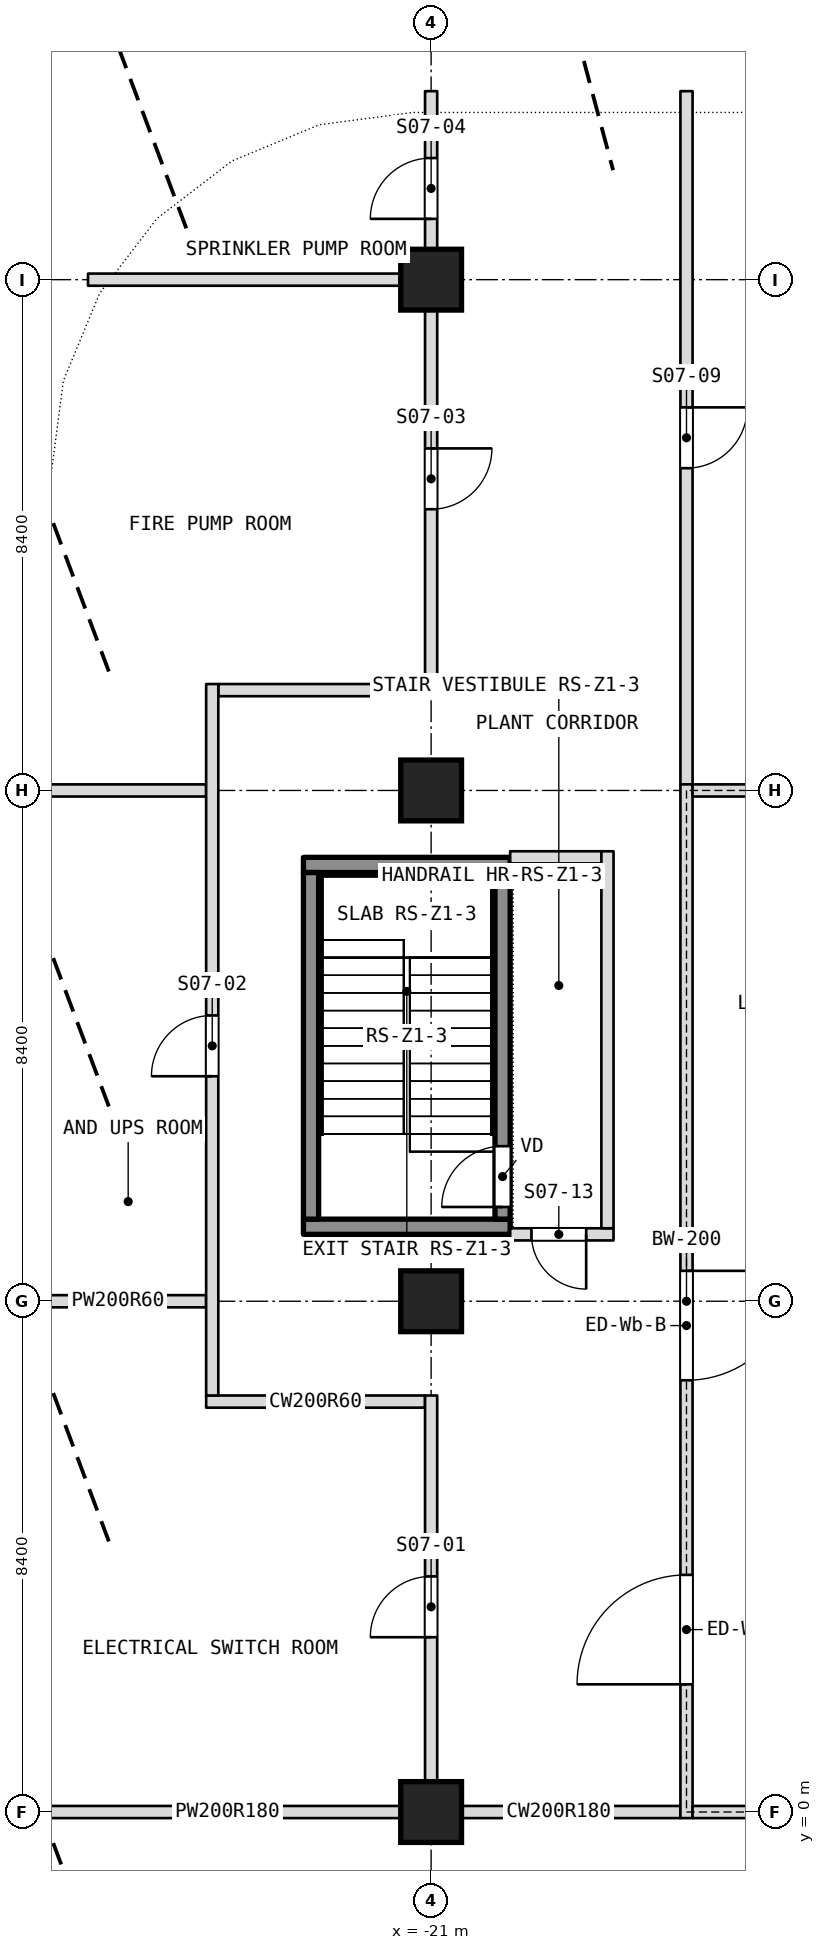
"""IFC4 building model, lengths in metres.
Left out: names, types, materials, properties, quantities, classifications, styles, units other than length and angle.
Written with IfcOpenShell. Run it as: python <this file> out.ifc"""

import sys

from ifc_helpers import new_model, si_unit, direction, frame, frame_2d, origin, origin_2d, place, context, subcontext, project, spatial, rectangle, extrude, element, fill, save


model = new_model("IFC4")
c1 = context("Model", 3, precision=1e-05, world=origin(), true_north=direction((0.0, 1.0)))
c2 = subcontext(c1, "Body", "Model", "MODEL_VIEW")
j1 = project(units=[si_unit("LENGTHUNIT", "METRE"), si_unit("PLANEANGLEUNIT", "RADIAN")], contexts=[c1])
p1 = place(None, origin())
s1 = spatial("IfcSite", under=j1, at=p1, CompositionType="ELEMENT")
p2 = place(p1, origin())
s2 = spatial("IfcBuilding", under=s1, at=p2, CompositionType="ELEMENT")
p3 = place(p2, frame((0.0, 0.0, 86.9)))
s3 = spatial("IfcBuildingStorey", under=s2, at=p3, CompositionType="ELEMENT", Elevation=86.9)
for number, where, z_axis, x_axis in (
    (1, (-21.0, 0.0, 0.0), (0.0, 0.0, 1.0), (1.0, 0.0, 0.0)),
    (2, (-21.0, 8.4, 0.0), (0.0, 0.0, 1.0), (1.0, 0.0, 0.0)),
    (3, (-21.0, 16.8, 0.0), (0.0, 0.0, 1.0), (1.0, 0.0, 0.0)),
    (4, (-21.0, 25.2, 0.0), (0.0, 0.0, 1.0), (1.0, 0.0, 0.0)),
):
    element("IfcColumn", number, at=place(p3, frame(where, z_axis=z_axis, x_axis=x_axis)), inside=s3, PredefinedType="COLUMN", context=c2, shape_type="SweptSolid", body=[
        extrude(rectangle(XDim=1.0, YDim=1.0, at=origin_2d()), origin(), (0.0, 0.0, 1.0), 10.8),
    ])
p4 = place(p3, frame((-27.6, 0.0, 0.0), z_axis=(0.0, 0.0, 1.0), x_axis=(1.0, 0.0, 0.0)))
e5 = element("IfcWall", 5, at=p4, inside=s3, PredefinedType="PARTITIONING", context=c2, shape_type="SweptSolid", body=[
    extrude(rectangle(XDim=6.5, YDim=0.2, at=frame_2d((3.25, 0.0))), origin(), (0.0, 0.0, 1.0), 10.09),
])
p5 = place(p3, frame((-20.9, 0.0, 0.0), z_axis=(0.0, 0.0, 1.0), x_axis=(1.0, 0.0, 0.0)))
e6 = element("IfcWall", 6, at=p5, inside=s3, PredefinedType="PARTITIONING", context=c2, shape_type="SweptSolid", body=[
    extrude(rectangle(XDim=4.0, YDim=0.2, at=frame_2d((2.0, 0.0))), origin(), (0.0, 0.0, 1.0), 10.09),
])
p6 = place(p3, frame((-24.7, 6.75, 0.0), z_axis=(0.0, 0.0, 1.0), x_axis=(1.0, 0.0, 0.0)))
e7 = element("IfcWall", 7, at=p6, inside=s3, PredefinedType="PARTITIONING", context=c2, shape_type="SweptSolid", body=[
    extrude(rectangle(XDim=3.6, YDim=0.2, at=frame_2d((1.8, 0.0))), origin(), (0.0, 0.0, 1.0), 10.54),
])
p7 = place(p3, frame((-27.6, 8.4, 0.0), z_axis=(0.0, 0.0, 1.0), x_axis=(1.0, 0.0, 0.0)))
e8 = element("IfcWall", 8, at=p7, inside=s3, PredefinedType="PARTITIONING", context=c2, shape_type="SweptSolid", body=[
    extrude(rectangle(XDim=2.9, YDim=0.2, at=frame_2d((1.45, 0.0))), origin(), (0.0, 0.0, 1.0), 10.09),
])
p8 = place(p3, frame((-19.7, 9.5, 0.0), z_axis=(0.0, 0.0, 1.0), x_axis=(1.0, 0.0, 0.0)))
e9 = element("IfcWall", 9, at=p8, inside=s3, PredefinedType="PARTITIONING", context=c2, shape_type="SweptSolid", body=[
    extrude(rectangle(XDim=1.7, YDim=0.2, at=frame_2d((0.85, 0.0))), origin(), (0.0, 0.0, 1.0), 10.54),
])
p9 = place(p8, frame((0.35, 0.0, 0.0)))
e10 = element("IfcOpeningElement", 10, at=p9, cuts=e9, PredefinedType="OPENING", context=c2, shape_type="SweptSolid", body=[
    extrude(rectangle(XDim=0.9, YDim=2.1, at=frame_2d((0.45, 1.05))), frame((0.0, 0.1, 0.0), z_axis=(0.0, -1.0, 0.0), x_axis=(1.0, 0.0, 0.0)), (0.0, 0.0, 1.0), 0.2),
])
p10 = place(p3, frame((-19.7, 15.7, 0.0), z_axis=(0.0, 0.0, 1.0), x_axis=(1.0, 0.0, 0.0)))
e11 = element("IfcWall", 11, at=p10, inside=s3, PredefinedType="PARTITIONING", context=c2, shape_type="SweptSolid", body=[
    extrude(rectangle(XDim=1.5, YDim=0.2, at=frame_2d((0.75, 0.0))), origin(), (0.0, 0.0, 1.0), 10.54),
])
p11 = place(p3, frame((-16.8, 16.9, 0.0), z_axis=(0.0, 0.0, 1.0), x_axis=(0.0, 1.0, 0.0)))
e12 = element("IfcWall", 12, at=p11, inside=s3, PredefinedType="PARTITIONING", context=c2, shape_type="SweptSolid", body=[
    extrude(rectangle(XDim=11.4, YDim=0.2, at=frame_2d((5.7, 0.0))), origin(), (0.0, 0.0, 1.0), 10.14),
])
p12 = place(p11, frame((5.2, 0.0, 0.0)))
e13 = element("IfcOpeningElement", 13, at=p12, cuts=e12, PredefinedType="OPENING", context=c2, shape_type="SweptSolid", body=[
    extrude(rectangle(XDim=1.0, YDim=2.1, at=frame_2d((0.5, 1.05))), frame((0.0, 0.1, 0.0), z_axis=(0.0, -1.0, 0.0), x_axis=(1.0, 0.0, 0.0)), (0.0, 0.0, 1.0), 0.2),
])
p13 = place(p3, frame((-27.6, 16.8, 0.0), z_axis=(0.0, 0.0, 1.0), x_axis=(1.0, 0.0, 0.0)))
e14 = element("IfcWall", 14, at=p13, inside=s3, PredefinedType="PARTITIONING", context=c2, shape_type="SweptSolid", body=[
    extrude(rectangle(XDim=2.9, YDim=0.2, at=frame_2d((1.45, 0.0))), origin(), (0.0, 0.0, 1.0), 10.09),
])
p14 = place(p3, frame((-18.1, 9.6, 0.0), z_axis=(0.0, 0.0, 1.0), x_axis=(0.0, 1.0, 0.0)))
e15 = element("IfcWall", 15, at=p14, inside=s3, PredefinedType="PARTITIONING", context=c2, shape_type="SweptSolid", body=[
    extrude(rectangle(XDim=6.2, YDim=0.2, at=frame_2d((3.1, 0.0))), origin(), (0.0, 0.0, 1.0), 10.54),
])
p15 = place(p3, frame((-24.5, 18.45, 0.0), z_axis=(0.0, 0.0, 1.0), x_axis=(1.0, 0.0, 0.0)))
e16 = element("IfcWall", 16, at=p15, inside=s3, PredefinedType="PARTITIONING", context=c2, shape_type="SweptSolid", body=[
    extrude(rectangle(XDim=3.6, YDim=0.2, at=frame_2d((1.8, 0.0))), origin(), (0.0, 0.0, 1.0), 10.54),
])
p16 = place(p3, frame((-21.0, -0.1, 0.0), z_axis=(0.0, 0.0, 1.0), x_axis=(0.0, 1.0, 0.0)))
e17 = element("IfcWall", 17, at=p16, inside=s3, PredefinedType="PARTITIONING", context=c2, shape_type="SweptSolid", body=[
    extrude(rectangle(XDim=6.95, YDim=0.2, at=frame_2d((3.475, 0.0))), origin(), (0.0, 0.0, 1.0), 10.54),
])
p17 = place(p16, frame((2.975, 0.0, 0.0)))
e18 = element("IfcOpeningElement", 18, at=p17, cuts=e17, PredefinedType="OPENING", context=c2, shape_type="SweptSolid", body=[
    extrude(rectangle(XDim=1.0, YDim=2.1, at=frame_2d((0.5, 1.05))), frame((0.0, 0.1, 0.0), z_axis=(0.0, -1.0, 0.0), x_axis=(1.0, 0.0, 0.0)), (0.0, 0.0, 1.0), 0.2),
])
p18 = place(p3, frame((-21.0, 18.55, 0.0), z_axis=(0.0, 0.0, 1.0), x_axis=(0.0, 1.0, 0.0)))
e19 = element("IfcWall", 19, at=p18, inside=s3, PredefinedType="PARTITIONING", context=c2, shape_type="SweptSolid", body=[
    extrude(rectangle(XDim=9.75, YDim=0.2, at=frame_2d((4.875, 0.0))), origin(), (0.0, 0.0, 1.0), 10.14),
])
p19 = place(p18, frame((2.875, 0.0, 0.0)))
e20 = element("IfcOpeningElement", 20, at=p19, cuts=e19, PredefinedType="OPENING", context=c2, shape_type="SweptSolid", body=[
    extrude(rectangle(XDim=1.0, YDim=2.1, at=frame_2d((0.5, 1.05))), frame((0.0, 0.1, 0.0), z_axis=(0.0, -1.0, 0.0), x_axis=(1.0, 0.0, 0.0)), (0.0, 0.0, 1.0), 0.2),
])
p20 = place(p18, frame((7.65, 0.0, 0.0)))
e21 = element("IfcOpeningElement", 21, at=p20, cuts=e19, PredefinedType="OPENING", context=c2, shape_type="SweptSolid", body=[
    extrude(rectangle(XDim=1.0, YDim=2.1, at=frame_2d((0.5, 1.05))), frame((0.0, 0.1, 0.0), z_axis=(0.0, -1.0, 0.0), x_axis=(1.0, 0.0, 0.0)), (0.0, 0.0, 1.0), 0.2),
])
p21 = place(p3, frame((-24.6, 6.85, 0.0), z_axis=(0.0, 0.0, 1.0), x_axis=(0.0, 1.0, 0.0)))
e22 = element("IfcWall", 22, at=p21, inside=s3, PredefinedType="PARTITIONING", context=c2, shape_type="SweptSolid", body=[
    extrude(rectangle(XDim=11.7, YDim=0.2, at=frame_2d((5.85, 0.0))), origin(), (0.0, 0.0, 1.0), 10.54),
])
p22 = place(p21, frame((5.25, 0.0, 0.0)))
e23 = element("IfcOpeningElement", 23, at=p22, cuts=e22, PredefinedType="OPENING", context=c2, shape_type="SweptSolid", body=[
    extrude(rectangle(XDim=1.0, YDim=2.1, at=frame_2d((0.5, 1.05))), frame((0.0, 0.1, 0.0), z_axis=(0.0, -1.0, 0.0), x_axis=(1.0, 0.0, 0.0)), (0.0, 0.0, 1.0), 0.2),
])
p23 = place(p3, frame((-26.643, 25.2, 0.0), z_axis=(0.0, 0.0, 1.0), x_axis=(1.0, 0.0, 0.0)))
e24 = element("IfcWall", 24, at=p23, inside=s3, PredefinedType="PARTITIONING", context=c2, shape_type="SweptSolid", body=[
    extrude(rectangle(XDim=5.543, YDim=0.2, at=frame_2d((2.771, 0.0))), origin(), (0.0, 0.0, 1.0), 10.09),
])
p24 = place(p3, frame((-16.8, -0.1, 0.0), z_axis=(0.0, 0.0, 1.0), x_axis=(0.0, 1.0, 0.0)))
e25 = element("IfcWall", 25, at=p24, inside=s3, PredefinedType="PARTITIONING", context=c2, shape_type="SweptSolid", body=[
    extrude(rectangle(XDim=17.0, YDim=0.2, at=frame_2d((8.5, 0.0))), origin(), (0.0, 0.0, 1.0), 10.54),
])
p25 = place(p24, frame((2.2, 0.0, 0.0)))
e26 = element("IfcOpeningElement", 26, at=p25, cuts=e25, PredefinedType="OPENING", context=c2, shape_type="SweptSolid", body=[
    extrude(rectangle(XDim=1.8, YDim=2.1, at=frame_2d((0.9, 1.05))), frame((0.0, 0.1, 0.0), z_axis=(0.0, -1.0, 0.0), x_axis=(1.0, 0.0, 0.0)), (0.0, 0.0, 1.0), 0.2),
])
p26 = place(p24, frame((7.2, 0.0, 0.0)))
e27 = element("IfcOpeningElement", 27, at=p26, cuts=e25, PredefinedType="OPENING", context=c2, shape_type="SweptSolid", body=[
    extrude(rectangle(XDim=1.8, YDim=2.1, at=frame_2d((0.9, 1.05))), frame((0.0, 0.1, 0.0), z_axis=(0.0, -1.0, 0.0), x_axis=(1.0, 0.0, 0.0)), (0.0, 0.0, 1.0), 0.2),
])
p27 = place(p3, frame((-16.7, 0.0, 0.0), z_axis=(0.0, 0.0, 1.0), x_axis=(1.0, 0.0, 0.0)))
e28 = element("IfcWall", 28, at=p27, inside=s3, PredefinedType="PARTITIONING", context=c2, shape_type="SweptSolid", body=[
    extrude(rectangle(XDim=4.4, YDim=0.2, at=frame_2d((2.2, 0.0))), origin(), (0.0, 0.0, 1.0), 10.09),
])
p28 = place(p27, frame((3.1, 0.0, 0.0)))
e29 = element("IfcOpeningElement", 29, at=p28, cuts=e28, PredefinedType="OPENING", context=c2, shape_type="SweptSolid", body=[
    extrude(rectangle(XDim=1.2, YDim=2.1, at=frame_2d((0.6, 1.05))), frame((0.0, 0.1, 0.0), z_axis=(0.0, -1.0, 0.0), x_axis=(1.0, 0.0, 0.0)), (0.0, 0.0, 1.0), 0.2),
])
p29 = place(p3, frame((-16.7, 16.8, 0.0), z_axis=(0.0, 0.0, 1.0), x_axis=(1.0, 0.0, 0.0)))
e30 = element("IfcWall", 30, at=p29, inside=s3, PredefinedType="PARTITIONING", context=c2, shape_type="SweptSolid", body=[
    extrude(rectangle(XDim=4.4, YDim=0.2, at=frame_2d((2.2, 0.0))), origin(), (0.0, 0.0, 1.0), 10.09),
])
p30 = place(p29, frame((3.1, 0.0, 0.0)))
e31 = element("IfcOpeningElement", 31, at=p30, cuts=e30, PredefinedType="OPENING", context=c2, shape_type="SweptSolid", body=[
    extrude(rectangle(XDim=1.2, YDim=2.1, at=frame_2d((0.6, 1.05))), frame((0.0, 0.1, 0.0), z_axis=(0.0, -1.0, 0.0), x_axis=(1.0, 0.0, 0.0)), (0.0, 0.0, 1.0), 0.2),
])
for number, where, z_axis, x_axis in (
    (32, (-23.1, 9.625, 0.1), (0.0, 0.0, 1.0), (1.0, 0.0, 0.0)),
    (33, (-23.1, 15.575, 0.1), (0.0, 0.0, 1.0), (1.0, 0.0, 0.0)),
):
    element("IfcWall", number, at=place(p3, frame(where, z_axis=z_axis, x_axis=x_axis)), inside=s3, PredefinedType="SHEAR", context=c2, shape_type="SweptSolid", body=[
        extrude(rectangle(XDim=3.4, YDim=0.25, at=frame_2d((1.7, 0.0))), origin(), (0.0, 0.0, 1.0), 10.8),
    ])
p31 = place(p3, frame((-22.975, 9.75, 0.1), z_axis=(0.0, 0.0, 1.0), x_axis=(0.0, 1.0, 0.0)))
e34 = element("IfcWall", 34, at=p31, inside=s3, PredefinedType="SHEAR", context=c2, shape_type="SweptSolid", body=[
    extrude(rectangle(XDim=5.7, YDim=0.25, at=frame_2d((2.85, 0.0))), origin(), (0.0, 0.0, 1.0), 10.8),
])
p32 = place(p3, frame((-19.825, 9.75, 0.1), z_axis=(0.0, 0.0, 1.0), x_axis=(0.0, 1.0, 0.0)))
e35 = element("IfcWall", 35, at=p32, inside=s3, PredefinedType="SHEAR", context=c2, shape_type="SweptSolid", body=[
    extrude(rectangle(XDim=5.7, YDim=0.25, at=frame_2d((2.85, 0.0))), origin(), (0.0, 0.0, 1.0), 10.8),
])
p33 = place(p32, frame((0.2, 0.0, 0.0)))
e36 = element("IfcOpeningElement", 36, at=p33, cuts=e35, PredefinedType="OPENING", context=c2, shape_type="SweptSolid", body=[
    extrude(rectangle(XDim=1.0, YDim=2.1, at=frame_2d((0.5, 1.05))), frame((0.0, 0.125, 0.0), z_axis=(0.0, -1.0, 0.0), x_axis=(1.0, 0.0, 0.0)), (0.0, 0.0, 1.0), 0.25),
])
p34 = place(p17, origin())
e37 = element("IfcDoor", 37, at=p34, inside=s3, OperationType="SINGLE_SWING_LEFT", PredefinedType="DOOR", context=c2, shape_type="SweptSolid", body=[
    extrude(rectangle(XDim=1.0, YDim=2.1, at=frame_2d((0.5, 1.05))), frame((0.0, 0.025, 0.0), z_axis=(0.0, -1.0, 0.0), x_axis=(1.0, 0.0, 0.0)), (0.0, 0.0, 1.0), 0.05),
])
fill(e18, e37)
p35 = place(p22, origin())
e38 = element("IfcDoor", 38, at=p35, inside=s3, OperationType="SINGLE_SWING_RIGHT", PredefinedType="DOOR", context=c2, shape_type="SweptSolid", body=[
    extrude(rectangle(XDim=1.0, YDim=2.1, at=frame_2d((0.5, 1.05))), frame((0.0, 0.025, 0.0), z_axis=(0.0, -1.0, 0.0), x_axis=(1.0, 0.0, 0.0)), (0.0, 0.0, 1.0), 0.05),
])
fill(e23, e38)
p36 = place(p19, origin())
e39 = element("IfcDoor", 39, at=p36, inside=s3, OperationType="SINGLE_SWING_RIGHT", PredefinedType="DOOR", context=c2, shape_type="SweptSolid", body=[
    extrude(rectangle(XDim=1.0, YDim=2.1, at=frame_2d((0.5, 1.05))), frame((0.0, 0.025, 0.0), z_axis=(0.0, -1.0, 0.0), x_axis=(1.0, 0.0, 0.0)), (0.0, 0.0, 1.0), 0.05),
])
fill(e20, e39)
p37 = place(p20, origin())
e40 = element("IfcDoor", 40, at=p37, inside=s3, OperationType="SINGLE_SWING_LEFT", PredefinedType="DOOR", context=c2, shape_type="SweptSolid", body=[
    extrude(rectangle(XDim=1.0, YDim=2.1, at=frame_2d((0.5, 1.05))), frame((0.0, 0.025, 0.0), z_axis=(0.0, -1.0, 0.0), x_axis=(1.0, 0.0, 0.0)), (0.0, 0.0, 1.0), 0.05),
])
fill(e21, e40)
p38 = place(p12, origin())
e41 = element("IfcDoor", 41, at=p38, inside=s3, OperationType="SINGLE_SWING_RIGHT", PredefinedType="DOOR", context=c2, shape_type="SweptSolid", body=[
    extrude(rectangle(XDim=1.0, YDim=2.1, at=frame_2d((0.5, 1.05))), frame((0.0, 0.025, 0.0), z_axis=(0.0, -1.0, 0.0), x_axis=(1.0, 0.0, 0.0)), (0.0, 0.0, 1.0), 0.05),
])
fill(e13, e41)
p39 = place(p9, origin())
e42 = element("IfcDoor", 42, at=p39, inside=s3, OperationType="SINGLE_SWING_RIGHT", PredefinedType="DOOR", context=c2, shape_type="SweptSolid", body=[
    extrude(rectangle(XDim=0.9, YDim=2.1, at=frame_2d((0.45, 1.05))), frame((0.0, 0.025, 0.0), z_axis=(0.0, -1.0, 0.0), x_axis=(1.0, 0.0, 0.0)), (0.0, 0.0, 1.0), 0.05),
])
fill(e10, e42)
p40 = place(p33, origin())
e43 = element("IfcDoor", 43, at=p40, inside=s3, OperationType="SINGLE_SWING_LEFT", PredefinedType="DOOR", context=c2, shape_type="SweptSolid", body=[
    extrude(rectangle(XDim=1.0, YDim=2.1, at=frame_2d((0.5, 1.05))), frame((0.0, 0.025, 0.0), z_axis=(0.0, -1.0, 0.0), x_axis=(1.0, 0.0, 0.0)), (0.0, 0.0, 1.0), 0.05),
])
fill(e36, e43)
p41 = place(p25, origin())
e44 = element("IfcDoor", 44, at=p41, inside=s3, OperationType="DOUBLE_DOOR_SINGLE_SWING", PredefinedType="DOOR", context=c2, shape_type="SweptSolid", body=[
    extrude(rectangle(XDim=1.8, YDim=2.1, at=frame_2d((0.9, 1.05))), frame((0.0, 0.025, 0.0), z_axis=(0.0, -1.0, 0.0), x_axis=(1.0, 0.0, 0.0)), (0.0, 0.0, 1.0), 0.05),
])
fill(e26, e44)
p42 = place(p26, origin())
e45 = element("IfcDoor", 45, at=p42, inside=s3, OperationType="DOUBLE_DOOR_SINGLE_SWING", PredefinedType="DOOR", context=c2, shape_type="SweptSolid", body=[
    extrude(rectangle(XDim=1.8, YDim=2.1, at=frame_2d((0.9, 1.05))), frame((0.0, 0.025, 0.0), z_axis=(0.0, -1.0, 0.0), x_axis=(1.0, 0.0, 0.0)), (0.0, 0.0, 1.0), 0.05),
])
fill(e27, e45)
save(model, sys.argv[1])
